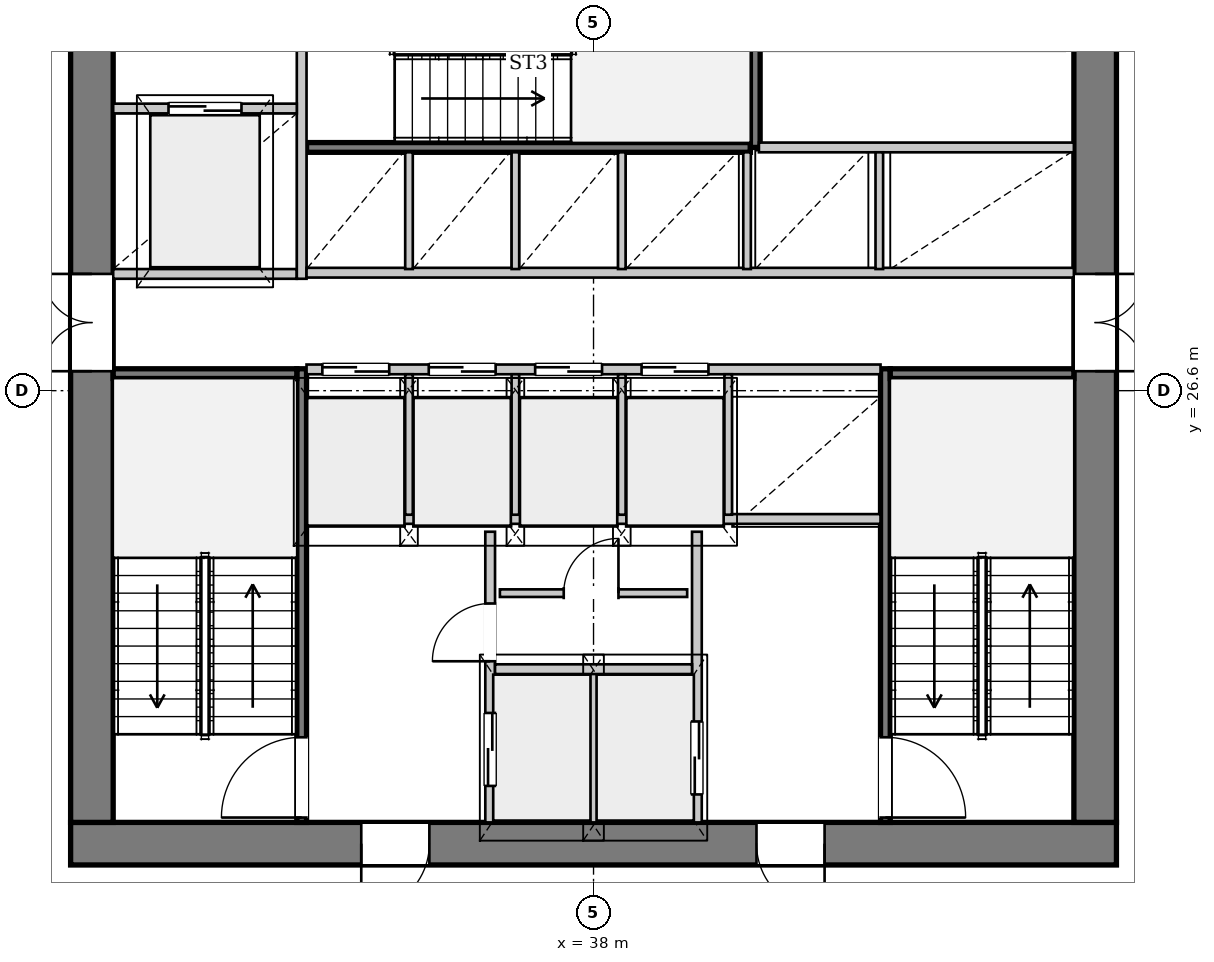
"""IFC4 building model, lengths in metres.
Left out: names, types, materials, properties, quantities, classifications, styles, units other than length and angle.
Written with IfcOpenShell. Run it as: python <this file> out.ifc"""

import sys

from ifc_helpers import new_model, si_unit, direction, frame, frame_2d, origin, place, context, subcontext, project, spatial, rectangle, extrude, source, transform, mapped, element, fill, save


model = new_model("IFC4")
c1 = context("Model", 3, precision=1e-05, world=origin(), true_north=direction((0.0, 1.0)))
c2 = subcontext(c1, "Body", "Model", "MODEL_VIEW")
j1 = project(units=[si_unit("LENGTHUNIT", "METRE"), si_unit("PLANEANGLEUNIT", "RADIAN")], contexts=[c1])
p1 = place(None, origin())
s1 = spatial("IfcSite", under=j1, at=p1, CompositionType="ELEMENT")
p2 = place(p1, origin())
s2 = spatial("IfcBuilding", under=s1, at=p2, CompositionType="ELEMENT")
p3 = place(p2, frame((0.0, 0.0, 130.55)))
s3 = spatial("IfcBuildingStorey", under=s2, at=p3, CompositionType="ELEMENT", Elevation=130.55)
p4 = place(p3, frame((46.6, 19.15, 0.0), z_axis=(0.0, 0.0, 1.0), x_axis=(-1.0, 0.0, 0.0)))
e1 = element("IfcWall", 1, at=p4, inside=s3, PredefinedType="SHEAR", context=c2, shape_type="SweptSolid", body=[
    extrude(rectangle(XDim=17.2, YDim=0.7, at=frame_2d((8.6, 0.0))), origin(), (0.0, 0.0, 1.0), 3.3),
])
p5 = place(p4, frame((4.8, 0.0, 0.0)))
e2 = element("IfcOpeningElement", 2, at=p5, cuts=e1, PredefinedType="OPENING", context=c2, shape_type="SweptSolid", body=[
    extrude(rectangle(XDim=1.12, YDim=2.25, at=frame_2d((0.56, 1.125))), frame((0.0, 0.36, 0.0), z_axis=(0.0, -1.0, 0.0), x_axis=(1.0, 0.0, 0.0)), (0.0, 0.0, 1.0), 0.72),
])
p6 = place(p4, frame((11.3, 0.0, 0.0)))
e3 = element("IfcOpeningElement", 3, at=p6, cuts=e1, PredefinedType="OPENING", context=c2, shape_type="SweptSolid", body=[
    extrude(rectangle(XDim=1.12, YDim=2.25, at=frame_2d((0.56, 1.125))), frame((0.0, 0.36, 0.0), z_axis=(0.0, -1.0, 0.0), x_axis=(1.0, 0.0, 0.0)), (0.0, 0.0, 1.0), 0.72),
])
p7 = place(p3, frame((29.75, 19.5, 0.0), z_axis=(0.0, 0.0, 1.0), x_axis=(0.0, 1.0, 0.0)))
e4 = element("IfcWall", 4, at=p7, inside=s3, PredefinedType="SHEAR", context=c2, shape_type="SweptSolid", body=[
    extrude(rectangle(XDim=14.2, YDim=0.7, at=frame_2d((7.1, 0.0))), origin(), (0.0, 0.0, 1.0), 3.3),
])
p8 = place(p7, frame((7.42, 0.0, 0.0)))
e5 = element("IfcOpeningElement", 5, at=p8, cuts=e4, PredefinedType="OPENING", context=c2, shape_type="SweptSolid", body=[
    extrude(rectangle(XDim=1.6, YDim=2.2, at=frame_2d((0.8, 1.1))), frame((0.0, 0.36, 0.0), z_axis=(0.0, -1.0, 0.0), x_axis=(1.0, 0.0, 0.0)), (0.0, 0.0, 1.0), 0.72),
])
p9 = place(p3, frame((46.25, 33.7, 0.0), z_axis=(0.0, 0.0, 1.0), x_axis=(0.0, -1.0, 0.0)))
e6 = element("IfcWall", 6, at=p9, inside=s3, PredefinedType="SHEAR", context=c2, shape_type="SweptSolid", body=[
    extrude(rectangle(XDim=14.2, YDim=0.7, at=frame_2d((7.1, 0.0))), origin(), (0.0, 0.0, 1.0), 3.3),
])
p10 = place(p9, frame((5.18, 0.0, 0.0)))
e7 = element("IfcOpeningElement", 7, at=p10, cuts=e6, PredefinedType="OPENING", context=c2, shape_type="SweptSolid", body=[
    extrude(rectangle(XDim=1.6, YDim=2.2, at=frame_2d((0.8, 1.1))), frame((0.0, 0.36, 0.0), z_axis=(0.0, -1.0, 0.0), x_axis=(1.0, 0.0, 0.0)), (0.0, 0.0, 1.0), 0.72),
])
p11 = place(p3, frame((33.2, 19.5, 0.0), z_axis=(0.0, 0.0, 1.0), x_axis=(0.0, 1.0, 0.0)))
e8 = element("IfcWall", 8, at=p11, inside=s3, PredefinedType="PARTITIONING", context=c2, shape_type="SweptSolid", body=[
    extrude(rectangle(XDim=7.46, YDim=0.16, at=frame_2d((3.73, 0.0))), origin(), (0.0, 0.0, 1.0), 3.3),
])
p12 = place(p11, frame((0.08, 0.0, 0.0)))
e9 = element("IfcOpeningElement", 9, at=p12, cuts=e8, PredefinedType="OPENING", context=c2, shape_type="SweptSolid", body=[
    extrude(rectangle(XDim=1.32, YDim=2.2, at=frame_2d((0.66, 1.1))), frame((0.0, 0.09, 0.0), z_axis=(0.0, -1.0, 0.0), x_axis=(1.0, 0.0, 0.0)), (0.0, 0.0, 1.0), 0.18),
])
p13 = place(p3, frame((30.1, 26.88, 0.0), z_axis=(0.0, 0.0, 1.0), x_axis=(1.0, 0.0, 0.0)))
e10 = element("IfcWall", 10, at=p13, inside=s3, PredefinedType="PARTITIONING", context=c2, shape_type="SweptSolid", body=[
    extrude(rectangle(XDim=3.02, YDim=0.16, at=frame_2d((1.51, 0.0))), origin(), (0.0, 0.0, 1.0), 3.3),
])
p14 = place(p3, frame((42.8, 26.96, 0.0), z_axis=(0.0, 0.0, 1.0), x_axis=(0.0, -1.0, 0.0)))
e11 = element("IfcWall", 11, at=p14, inside=s3, PredefinedType="PARTITIONING", context=c2, shape_type="SweptSolid", body=[
    extrude(rectangle(XDim=7.46, YDim=0.16, at=frame_2d((3.73, 0.0))), origin(), (0.0, 0.0, 1.0), 3.3),
])
p15 = place(p14, frame((6.06, 0.0, 0.0)))
e12 = element("IfcOpeningElement", 12, at=p15, cuts=e11, PredefinedType="OPENING", context=c2, shape_type="SweptSolid", body=[
    extrude(rectangle(XDim=1.32, YDim=2.2, at=frame_2d((0.66, 1.1))), frame((0.0, 0.09, 0.0), z_axis=(0.0, -1.0, 0.0), x_axis=(1.0, 0.0, 0.0)), (0.0, 0.0, 1.0), 0.18),
])
p16 = place(p3, frame((42.88, 26.88, 0.0), z_axis=(0.0, 0.0, 1.0), x_axis=(1.0, 0.0, 0.0)))
e13 = element("IfcWall", 13, at=p16, inside=s3, PredefinedType="PARTITIONING", context=c2, shape_type="SweptSolid", body=[
    extrude(rectangle(XDim=3.02, YDim=0.16, at=frame_2d((1.51, 0.0))), origin(), (0.0, 0.0, 1.0), 3.3),
])
p17 = place(p3, frame((33.28, 30.6, 0.0), z_axis=(0.0, 0.0, 1.0), x_axis=(1.0, 0.0, 0.0)))
e14 = element("IfcWall", 14, at=p17, inside=s3, PredefinedType="PARTITIONING", context=c2, shape_type="SweptSolid", body=[
    extrude(rectangle(XDim=7.3, YDim=0.16, at=frame_2d((3.65, 0.0))), origin(), (0.0, 0.0, 1.0), 3.3),
])
p18 = place(p3, frame((40.66, 30.6, 0.0), z_axis=(0.0, 0.0, 1.0), x_axis=(0.0, 1.0, 0.0)))
e15 = element("IfcWall", 15, at=p18, inside=s3, PredefinedType="PARTITIONING", context=c2, shape_type="SweptSolid", body=[
    extrude(rectangle(XDim=3.1, YDim=0.16, at=frame_2d((1.55, 0.0))), origin(), (0.0, 0.0, 1.0), 3.3),
])
p19 = place(p3, frame((36.3, 19.5, 0.0), z_axis=(0.0, 0.0, 1.0), x_axis=(0.0, 1.0, 0.0)))
e16 = element("IfcWall", 16, at=p19, inside=s3, PredefinedType="PARTITIONING", context=c2, shape_type="SweptSolid", body=[
    extrude(rectangle(XDim=4.78, YDim=0.16, at=frame_2d((2.39, 0.0))), origin(), (0.0, 0.0, 1.0), 3.3),
])
p20 = place(p19, frame((0.6, 0.0, 0.0)))
e17 = element("IfcOpeningElement", 17, at=p20, cuts=e16, PredefinedType="OPENING", context=c2, shape_type="SweptSolid", body=[
    extrude(rectangle(XDim=1.2, YDim=2.2, at=frame_2d((0.6, 1.1))), frame((0.0, 0.09, 0.0), z_axis=(0.0, -1.0, 0.0), x_axis=(1.0, 0.0, 0.0)), (0.0, 0.0, 1.0), 0.18),
])
p21 = place(p19, frame((2.65, 0.0, 0.0)))
e18 = element("IfcOpeningElement", 18, at=p21, cuts=e16, PredefinedType="OPENING", context=c2, shape_type="SweptSolid", body=[
    extrude(rectangle(XDim=0.95, YDim=2.1, at=frame_2d((0.475, 1.05))), frame((0.0, 0.09, 0.0), z_axis=(0.0, -1.0, 0.0), x_axis=(1.0, 0.0, 0.0)), (0.0, 0.0, 1.0), 0.18),
])
p22 = place(p3, frame((39.7, 24.28, 0.0), z_axis=(0.0, 0.0, 1.0), x_axis=(0.0, -1.0, 0.0)))
e19 = element("IfcWall", 19, at=p22, inside=s3, PredefinedType="PARTITIONING", context=c2, shape_type="SweptSolid", body=[
    extrude(rectangle(XDim=4.78, YDim=0.16, at=frame_2d((2.39, 0.0))), origin(), (0.0, 0.0, 1.0), 3.3),
])
p23 = place(p22, frame((3.12, 0.0, 0.0)))
e20 = element("IfcOpeningElement", 20, at=p23, cuts=e19, PredefinedType="OPENING", context=c2, shape_type="SweptSolid", body=[
    extrude(rectangle(XDim=1.2, YDim=2.2, at=frame_2d((0.6, 1.1))), frame((0.0, 0.09, 0.0), z_axis=(0.0, -1.0, 0.0), x_axis=(1.0, 0.0, 0.0)), (0.0, 0.0, 1.0), 0.18),
])
p24 = place(p3, frame((38.0, 19.5, 0.0), z_axis=(0.0, 0.0, 1.0), x_axis=(0.0, 1.0, 0.0)))
e21 = element("IfcWall", 21, at=p24, inside=s3, PredefinedType="PARTITIONING", context=c2, shape_type="SweptSolid", body=[
    extrude(rectangle(XDim=2.46, YDim=0.125, at=frame_2d((1.23, 0.0))), origin(), (0.0, 0.0, 1.0), 3.3),
])
p25 = place(p3, frame((36.38, 22.02, 0.0), z_axis=(0.0, 0.0, 1.0), x_axis=(1.0, 0.0, 0.0)))
e22 = element("IfcWall", 22, at=p25, inside=s3, PredefinedType="PARTITIONING", context=c2, shape_type="SweptSolid", body=[
    extrude(rectangle(XDim=3.24, YDim=0.16, at=frame_2d((1.62, 0.0))), origin(), (0.0, 0.0, 1.0), 3.3),
])
p26 = place(p3, frame((33.28, 24.49, 0.0), z_axis=(0.0, 0.0, 1.0), x_axis=(1.0, 0.0, 0.0)))
e23 = element("IfcWall", 23, at=p26, inside=s3, PredefinedType="PARTITIONING", context=c2, shape_type="SweptSolid", body=[
    extrude(rectangle(XDim=9.44, YDim=0.16, at=frame_2d((4.72, 0.0))), origin(), (0.0, 0.0, 1.0), 3.3),
])
p27 = place(p3, frame((36.46, 23.27, 0.0), z_axis=(0.0, 0.0, 1.0), x_axis=(1.0, 0.0, 0.0)))
e24 = element("IfcWall", 24, at=p27, inside=s3, PredefinedType="PARTITIONING", context=c2, shape_type="SweptSolid", body=[
    extrude(rectangle(XDim=3.08, YDim=0.125, at=frame_2d((1.54, 0.0))), origin(), (0.0, 0.0, 1.0), 3.3),
])
p28 = place(p27, frame((1.05, 0.0, 0.0)))
e25 = element("IfcOpeningElement", 25, at=p28, cuts=e24, PredefinedType="OPENING", context=c2, shape_type="SweptSolid", body=[
    extrude(rectangle(XDim=0.9, YDim=2.1, at=frame_2d((0.45, 1.05))), frame((0.0, 0.073, 0.0), z_axis=(0.0, -1.0, 0.0), x_axis=(1.0, 0.0, 0.0)), (0.0, 0.0, 1.0), 0.145),
])
p29 = place(p3, frame((30.1, 28.52, 0.0), z_axis=(0.0, 0.0, 1.0), x_axis=(1.0, 0.0, 0.0)))
e26 = element("IfcWall", 26, at=p29, inside=s3, PredefinedType="PARTITIONING", context=c2, shape_type="SweptSolid", body=[
    extrude(rectangle(XDim=3.02, YDim=0.16, at=frame_2d((1.51, 0.0))), origin(), (0.0, 0.0, 1.0), 3.3),
])
p30 = place(p3, frame((33.2, 28.44, 0.0), z_axis=(0.0, 0.0, 1.0), x_axis=(0.0, 1.0, 0.0)))
e27 = element("IfcWall", 27, at=p30, inside=s3, PredefinedType="PARTITIONING", context=c2, shape_type="SweptSolid", body=[
    extrude(rectangle(XDim=5.26, YDim=0.16, at=frame_2d((2.63, 0.0))), origin(), (0.0, 0.0, 1.0), 3.3),
])
p31 = place(p3, frame((30.1, 31.24, 0.0), z_axis=(0.0, 0.0, 1.0), x_axis=(1.0, 0.0, 0.0)))
e28 = element("IfcWall", 28, at=p31, inside=s3, PredefinedType="PARTITIONING", context=c2, shape_type="SweptSolid", body=[
    extrude(rectangle(XDim=3.02, YDim=0.16, at=frame_2d((1.51, 0.0))), origin(), (0.0, 0.0, 1.0), 3.3),
])
p32 = place(p31, frame((0.91, 0.0, 0.0)))
e29 = element("IfcOpeningElement", 29, at=p32, cuts=e28, PredefinedType="OPENING", context=c2, shape_type="SweptSolid", body=[
    extrude(rectangle(XDim=1.2, YDim=2.2, at=frame_2d((0.6, 1.1))), frame((0.0, 0.09, 0.0), z_axis=(0.0, -1.0, 0.0), x_axis=(1.0, 0.0, 0.0)), (0.0, 0.0, 1.0), 0.18),
])
p33 = place(p3, frame((33.28, 26.95, 0.0), z_axis=(0.0, 0.0, 1.0), x_axis=(1.0, 0.0, 0.0)))
e30 = element("IfcWall", 30, at=p33, inside=s3, PredefinedType="PARTITIONING", context=c2, shape_type="SweptSolid", body=[
    extrude(rectangle(XDim=9.44, YDim=0.16, at=frame_2d((4.72, 0.0))), origin(), (0.0, 0.0, 1.0), 3.3),
])
p34 = place(p33, frame((0.26, 0.0, 0.0)))
e31 = element("IfcOpeningElement", 31, at=p34, cuts=e30, PredefinedType="OPENING", context=c2, shape_type="SweptSolid", body=[
    extrude(rectangle(XDim=1.1, YDim=2.2, at=frame_2d((0.55, 1.1))), frame((0.0, 0.09, 0.0), z_axis=(0.0, -1.0, 0.0), x_axis=(1.0, 0.0, 0.0)), (0.0, 0.0, 1.0), 0.18),
])
p35 = place(p33, frame((2.01, 0.0, 0.0)))
e32 = element("IfcOpeningElement", 32, at=p35, cuts=e30, PredefinedType="OPENING", context=c2, shape_type="SweptSolid", body=[
    extrude(rectangle(XDim=1.1, YDim=2.2, at=frame_2d((0.55, 1.1))), frame((0.0, 0.09, 0.0), z_axis=(0.0, -1.0, 0.0), x_axis=(1.0, 0.0, 0.0)), (0.0, 0.0, 1.0), 0.18),
])
p36 = place(p33, frame((3.76, 0.0, 0.0)))
e33 = element("IfcOpeningElement", 33, at=p36, cuts=e30, PredefinedType="OPENING", context=c2, shape_type="SweptSolid", body=[
    extrude(rectangle(XDim=1.1, YDim=2.2, at=frame_2d((0.55, 1.1))), frame((0.0, 0.09, 0.0), z_axis=(0.0, -1.0, 0.0), x_axis=(1.0, 0.0, 0.0)), (0.0, 0.0, 1.0), 0.18),
])
p37 = place(p33, frame((5.51, 0.0, 0.0)))
e34 = element("IfcOpeningElement", 34, at=p37, cuts=e30, PredefinedType="OPENING", context=c2, shape_type="SweptSolid", body=[
    extrude(rectangle(XDim=1.1, YDim=2.2, at=frame_2d((0.55, 1.1))), frame((0.0, 0.09, 0.0), z_axis=(0.0, -1.0, 0.0), x_axis=(1.0, 0.0, 0.0)), (0.0, 0.0, 1.0), 0.18),
])
for number, where, z_axis, x_axis in (
    (35, (34.965, 24.56, 0.0), (0.0, 0.0, 1.0), (0.0, 1.0, 0.0)),
    (36, (36.715, 24.56, 0.0), (0.0, 0.0, 1.0), (0.0, 1.0, 0.0)),
    (37, (38.465, 24.56, 0.0), (0.0, 0.0, 1.0), (0.0, 1.0, 0.0)),
    (38, (40.215, 24.56, 0.0), (0.0, 0.0, 1.0), (0.0, 1.0, 0.0)),
):
    element("IfcWall", number, at=place(p3, frame(where, z_axis=z_axis, x_axis=x_axis)), inside=s3, PredefinedType="PARTITIONING", context=c2, shape_type="SweptSolid", body=[
        extrude(rectangle(XDim=2.31, YDim=0.125, at=frame_2d((1.155, 0.0))), origin(), (0.0, 0.0, 1.0), 3.3),
    ])
p38 = place(p3, frame((33.28, 28.54, 0.0), z_axis=(0.0, 0.0, 1.0), x_axis=(1.0, 0.0, 0.0)))
e39 = element("IfcWall", 39, at=p38, inside=s3, PredefinedType="PARTITIONING", context=c2, shape_type="SweptSolid", body=[
    extrude(rectangle(XDim=12.62, YDim=0.16, at=frame_2d((6.31, 0.0))), origin(), (0.0, 0.0, 1.0), 3.3),
])
p39 = place(p3, frame((40.72, 30.6, 0.0), z_axis=(0.0, 0.0, 1.0), x_axis=(1.0, 0.0, 0.0)))
e40 = element("IfcWall", 40, at=p39, inside=s3, PredefinedType="PARTITIONING", context=c2, shape_type="SweptSolid", body=[
    extrude(rectangle(XDim=5.18, YDim=0.16, at=frame_2d((2.59, 0.0))), origin(), (0.0, 0.0, 1.0), 3.3),
])
for number, where, z_axis, x_axis in (
    (41, (34.965, 28.6, 0.0), (0.0, 0.0, 1.0), (0.0, 1.0, 0.0)),
    (42, (36.715, 28.6, 0.0), (0.0, 0.0, 1.0), (0.0, 1.0, 0.0)),
    (43, (38.465, 28.6, 0.0), (0.0, 0.0, 1.0), (0.0, 1.0, 0.0)),
    (44, (40.525, 28.6, 0.0), (0.0, 0.0, 1.0), (0.0, 1.0, 0.0)),
    (45, (42.7, 28.6, 0.0), (0.0, 0.0, 1.0), (0.0, 1.0, 0.0)),
):
    element("IfcWall", number, at=place(p3, frame(where, z_axis=z_axis, x_axis=x_axis)), inside=s3, PredefinedType="PARTITIONING", context=c2, shape_type="SweptSolid", body=[
        extrude(rectangle(XDim=1.92, YDim=0.125, at=frame_2d((0.96, 0.0))), origin(), (0.0, 0.0, 1.0), 3.3),
    ])
m1 = source(origin(), c2, "Body", "SweptSolid", [
    extrude(rectangle(XDim=1.12, YDim=2.25, at=frame_2d((0.56, 1.125))), frame((0.0, 0.025, 0.0), z_axis=(0.0, -1.0, 0.0), x_axis=(1.0, 0.0, 0.0)), (0.0, 0.0, 1.0), 0.05),
])
p40 = place(p5, origin())
e46 = element("IfcDoor", 46, at=p40, inside=s3, OperationType="SINGLE_SWING_LEFT", PredefinedType="DOOR", context=c2, shape_type="MappedRepresentation", body=[
    mapped(m1, transform((0.0, 0.0, 0.0), x_axis=(1.0, 0.0, 0.0), y_axis=(0.0, 1.0, 0.0), z_axis=(0.0, 0.0, 1.0), scale=1.0)),
])
fill(e2, e46)
p41 = place(p6, origin())
e47 = element("IfcDoor", 47, at=p41, inside=s3, OperationType="SINGLE_SWING_RIGHT", PredefinedType="DOOR", context=c2, shape_type="MappedRepresentation", body=[
    mapped(m1, transform((0.0, 0.0, 0.0), x_axis=(1.0, 0.0, 0.0), y_axis=(0.0, 1.0, 0.0), z_axis=(0.0, 0.0, 1.0), scale=1.0)),
])
fill(e3, e47)
m2 = source(origin(), c2, "Body", "SweptSolid", [
    extrude(rectangle(XDim=1.6, YDim=2.2, at=frame_2d((0.8, 1.1))), frame((0.0, 0.025, 0.0), z_axis=(0.0, -1.0, 0.0), x_axis=(1.0, 0.0, 0.0)), (0.0, 0.0, 1.0), 0.05),
])
p42 = place(p8, origin())
e48 = element("IfcDoor", 48, at=p42, inside=s3, OperationType="DOUBLE_DOOR_SINGLE_SWING", PredefinedType="DOOR", context=c2, shape_type="MappedRepresentation", body=[
    mapped(m2, transform((0.0, 0.0, 0.0), x_axis=(1.0, 0.0, 0.0), y_axis=(0.0, 1.0, 0.0), z_axis=(0.0, 0.0, 1.0), scale=1.0)),
])
fill(e5, e48)
p43 = place(p10, origin())
e49 = element("IfcDoor", 49, at=p43, inside=s3, OperationType="DOUBLE_DOOR_SINGLE_SWING", PredefinedType="DOOR", context=c2, shape_type="MappedRepresentation", body=[
    mapped(m2, transform((0.0, 0.0, 0.0), x_axis=(1.0, 0.0, 0.0), y_axis=(0.0, 1.0, 0.0), z_axis=(0.0, 0.0, 1.0), scale=1.0)),
])
fill(e7, e49)
m3 = source(origin(), c2, "Body", "SweptSolid", [
    extrude(rectangle(XDim=1.32, YDim=2.2, at=frame_2d((0.66, 1.1))), frame((0.0, 0.025, 0.0), z_axis=(0.0, -1.0, 0.0), x_axis=(1.0, 0.0, 0.0)), (0.0, 0.0, 1.0), 0.05),
])
p44 = place(p12, origin())
e50 = element("IfcDoor", 50, at=p44, inside=s3, OperationType="SINGLE_SWING_LEFT", PredefinedType="DOOR", context=c2, shape_type="MappedRepresentation", body=[
    mapped(m3, transform((0.0, 0.0, 0.0), x_axis=(1.0, 0.0, 0.0), y_axis=(0.0, 1.0, 0.0), z_axis=(0.0, 0.0, 1.0), scale=1.0)),
])
fill(e9, e50)
p45 = place(p15, origin())
e51 = element("IfcDoor", 51, at=p45, inside=s3, OperationType="SINGLE_SWING_RIGHT", PredefinedType="DOOR", context=c2, shape_type="MappedRepresentation", body=[
    mapped(m3, transform((0.0, 0.0, 0.0), x_axis=(1.0, 0.0, 0.0), y_axis=(0.0, 1.0, 0.0), z_axis=(0.0, 0.0, 1.0), scale=1.0)),
])
fill(e12, e51)
m4 = source(origin(), c2, "Body", "SweptSolid", [
    extrude(rectangle(XDim=1.2, YDim=2.2, at=frame_2d((0.6, 1.1))), frame((0.0, 0.025, 0.0), z_axis=(0.0, -1.0, 0.0), x_axis=(1.0, 0.0, 0.0)), (0.0, 0.0, 1.0), 0.05),
])
p46 = place(p20, origin())
e52 = element("IfcDoor", 52, at=p46, inside=s3, OperationType="DOUBLE_DOOR_SLIDING", PredefinedType="DOOR", context=c2, shape_type="MappedRepresentation", body=[
    mapped(m4, transform((0.0, 0.0, 0.0), x_axis=(1.0, 0.0, 0.0), y_axis=(0.0, 1.0, 0.0), z_axis=(0.0, 0.0, 1.0), scale=1.0)),
])
fill(e17, e52)
m5 = source(origin(), c2, "Body", "SweptSolid", [
    extrude(rectangle(XDim=0.95, YDim=2.1, at=frame_2d((0.475, 1.05))), frame((0.0, 0.025, 0.0), z_axis=(0.0, -1.0, 0.0), x_axis=(1.0, 0.0, 0.0)), (0.0, 0.0, 1.0), 0.05),
])
p47 = place(p21, origin())
e53 = element("IfcDoor", 53, at=p47, inside=s3, OperationType="SINGLE_SWING_LEFT", PredefinedType="DOOR", context=c2, shape_type="MappedRepresentation", body=[
    mapped(m5, transform((0.0, 0.0, 0.0), x_axis=(1.0, 0.0, 0.0), y_axis=(0.0, 1.0, 0.0), z_axis=(0.0, 0.0, 1.0), scale=1.0)),
])
fill(e18, e53)
m6 = source(origin(), c2, "Body", "SweptSolid", [
    extrude(rectangle(XDim=0.9, YDim=2.1, at=frame_2d((0.45, 1.05))), frame((0.0, 0.025, 0.0), z_axis=(0.0, -1.0, 0.0), x_axis=(1.0, 0.0, 0.0)), (0.0, 0.0, 1.0), 0.05),
])
p48 = place(p28, origin())
e54 = element("IfcDoor", 54, at=p48, inside=s3, OperationType="SINGLE_SWING_RIGHT", PredefinedType="DOOR", context=c2, shape_type="MappedRepresentation", body=[
    mapped(m6, transform((0.0, 0.0, 0.0), x_axis=(1.0, 0.0, 0.0), y_axis=(0.0, 1.0, 0.0), z_axis=(0.0, 0.0, 1.0), scale=1.0)),
])
fill(e25, e54)
p49 = place(p23, origin())
e55 = element("IfcDoor", 55, at=p49, inside=s3, OperationType="DOUBLE_DOOR_SLIDING", PredefinedType="DOOR", context=c2, shape_type="MappedRepresentation", body=[
    mapped(m4, transform((0.0, 0.0, 0.0), x_axis=(1.0, 0.0, 0.0), y_axis=(0.0, 1.0, 0.0), z_axis=(0.0, 0.0, 1.0), scale=1.0)),
])
fill(e20, e55)
p50 = place(p32, origin())
e56 = element("IfcDoor", 56, at=p50, inside=s3, OperationType="DOUBLE_DOOR_SLIDING", PredefinedType="DOOR", context=c2, shape_type="MappedRepresentation", body=[
    mapped(m4, transform((0.0, 0.0, 0.0), x_axis=(1.0, 0.0, 0.0), y_axis=(0.0, 1.0, 0.0), z_axis=(0.0, 0.0, 1.0), scale=1.0)),
])
fill(e29, e56)
m7 = source(origin(), c2, "Body", "SweptSolid", [
    extrude(rectangle(XDim=1.1, YDim=2.2, at=frame_2d((0.55, 1.1))), frame((0.0, 0.025, 0.0), z_axis=(0.0, -1.0, 0.0), x_axis=(1.0, 0.0, 0.0)), (0.0, 0.0, 1.0), 0.05),
])
p51 = place(p34, origin())
e57 = element("IfcDoor", 57, at=p51, inside=s3, OperationType="DOUBLE_DOOR_SLIDING", PredefinedType="DOOR", context=c2, shape_type="MappedRepresentation", body=[
    mapped(m7, transform((0.0, 0.0, 0.0), x_axis=(1.0, 0.0, 0.0), y_axis=(0.0, 1.0, 0.0), z_axis=(0.0, 0.0, 1.0), scale=1.0)),
])
fill(e31, e57)
p52 = place(p35, origin())
e58 = element("IfcDoor", 58, at=p52, inside=s3, OperationType="DOUBLE_DOOR_SLIDING", PredefinedType="DOOR", context=c2, shape_type="MappedRepresentation", body=[
    mapped(m7, transform((0.0, 0.0, 0.0), x_axis=(1.0, 0.0, 0.0), y_axis=(0.0, 1.0, 0.0), z_axis=(0.0, 0.0, 1.0), scale=1.0)),
])
fill(e32, e58)
p53 = place(p36, origin())
e59 = element("IfcDoor", 59, at=p53, inside=s3, OperationType="DOUBLE_DOOR_SLIDING", PredefinedType="DOOR", context=c2, shape_type="MappedRepresentation", body=[
    mapped(m7, transform((0.0, 0.0, 0.0), x_axis=(1.0, 0.0, 0.0), y_axis=(0.0, 1.0, 0.0), z_axis=(0.0, 0.0, 1.0), scale=1.0)),
])
fill(e33, e59)
p54 = place(p37, origin())
e60 = element("IfcDoor", 60, at=p54, inside=s3, OperationType="DOUBLE_DOOR_SLIDING", PredefinedType="DOOR", context=c2, shape_type="MappedRepresentation", body=[
    mapped(m7, transform((0.0, 0.0, 0.0), x_axis=(1.0, 0.0, 0.0), y_axis=(0.0, 1.0, 0.0), z_axis=(0.0, 0.0, 1.0), scale=1.0)),
])
fill(e34, e60)
save(model, sys.argv[1])
